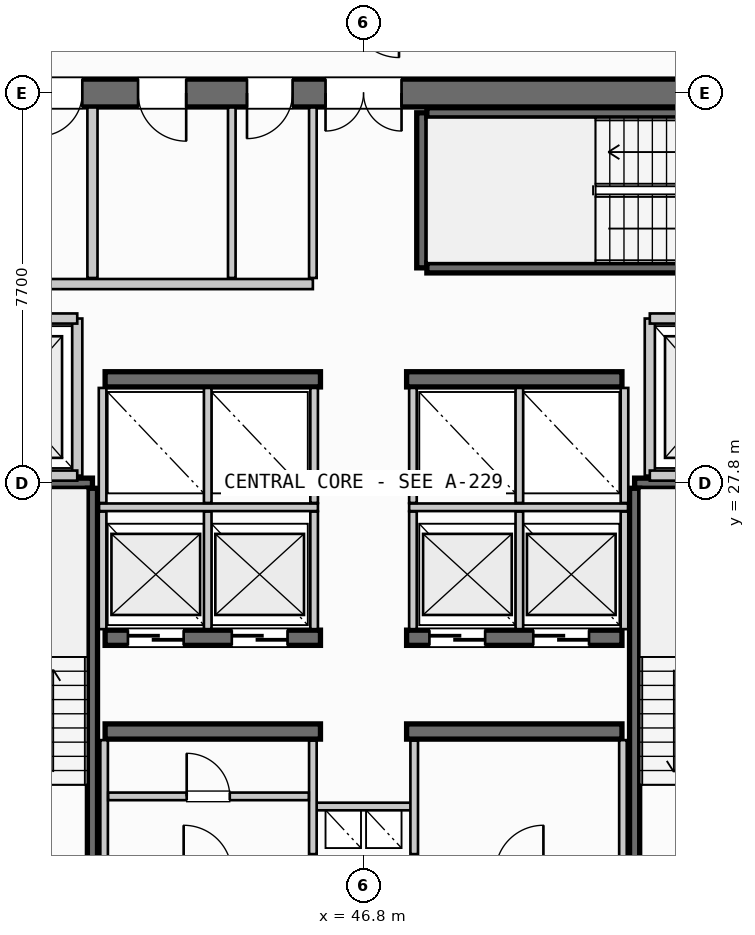
"""IFC4 building model, lengths in metres.
Left out: names, types, materials, properties, quantities, classifications, styles, units other than length and angle.
Written with IfcOpenShell. Run it as: python <this file> out.ifc"""

import sys

from ifc_helpers import new_model, si_unit, direction, frame, frame_2d, origin, place, context, subcontext, project, spatial, rectangle, extrude, source, transform, mapped, element, fill, save


model = new_model("IFC4")
c1 = context("Model", 3, precision=1e-05, world=origin(), true_north=direction((0.0, 1.0)))
c2 = subcontext(c1, "Body", "Model", "MODEL_VIEW")
j1 = project(units=[si_unit("LENGTHUNIT", "METRE"), si_unit("PLANEANGLEUNIT", "RADIAN")], contexts=[c1])
p1 = place(None, origin())
s1 = spatial("IfcSite", under=j1, at=p1, CompositionType="ELEMENT")
p2 = place(p1, origin())
s2 = spatial("IfcBuilding", under=s1, at=p2, CompositionType="ELEMENT")
p3 = place(p2, frame((0.0, 0.0, 207.9)))
s3 = spatial("IfcBuildingStorey", under=s2, at=p3, CompositionType="ELEMENT", Elevation=207.9)
p4 = place(p3, frame((55.6, 35.5, 0.0), z_axis=(0.0, 0.0, 1.0), x_axis=(-1.0, 0.0, 0.0)))
e1 = element("IfcWall", 1, at=p4, inside=s3, PredefinedType="SHEAR", context=c2, shape_type="SweptSolid", body=[
    extrude(rectangle(XDim=17.6, YDim=0.55, at=frame_2d((8.8, 0.0))), origin(), (0.0, 0.0, 1.0), 3.26),
])
p5 = place(p4, frame((8.05, 0.0, 0.0)))
e2 = element("IfcOpeningElement", 2, at=p5, cuts=e1, PredefinedType="OPENING", context=c2, shape_type="SweptSolid", body=[
    extrude(rectangle(XDim=1.5, YDim=2.2, at=frame_2d((0.75, 1.1))), frame((0.0, 0.285, 0.0), z_axis=(0.0, -1.0, 0.0), x_axis=(1.0, 0.0, 0.0)), (0.0, 0.0, 1.0), 0.57),
])
p6 = place(p4, frame((15.85, 0.0, 0.0)))
e3 = element("IfcOpeningElement", 3, at=p6, cuts=e1, PredefinedType="OPENING", context=c2, shape_type="SweptSolid", body=[
    extrude(rectangle(XDim=0.85, YDim=2.15, at=frame_2d((0.425, 1.075))), frame((0.0, 0.285, 0.0), z_axis=(0.0, -1.0, 0.0), x_axis=(1.0, 0.0, 0.0)), (0.0, 0.0, 1.0), 0.57),
])
p7 = place(p4, frame((14.35, 0.0, 0.0)))
e4 = element("IfcOpeningElement", 4, at=p7, cuts=e1, PredefinedType="OPENING", context=c2, shape_type="SweptSolid", body=[
    extrude(rectangle(XDim=0.85, YDim=2.15, at=frame_2d((0.425, 1.075))), frame((0.0, 0.285, 0.0), z_axis=(0.0, -1.0, 0.0), x_axis=(1.0, 0.0, 0.0)), (0.0, 0.0, 1.0), 0.57),
])
p8 = place(p4, frame((12.3, 0.0, 0.0)))
e5 = element("IfcOpeningElement", 5, at=p8, cuts=e1, PredefinedType="OPENING", context=c2, shape_type="SweptSolid", body=[
    extrude(rectangle(XDim=0.95, YDim=2.15, at=frame_2d((0.475, 1.075))), frame((0.0, 0.285, 0.0), z_axis=(0.0, -1.0, 0.0), x_axis=(1.0, 0.0, 0.0)), (0.0, 0.0, 1.0), 0.57),
])
p9 = place(p4, frame((10.2, 0.0, 0.0)))
e6 = element("IfcOpeningElement", 6, at=p9, cuts=e1, PredefinedType="OPENING", context=c2, shape_type="SweptSolid", body=[
    extrude(rectangle(XDim=0.9, YDim=2.15, at=frame_2d((0.45, 1.075))), frame((0.0, 0.285, 0.0), z_axis=(0.0, -1.0, 0.0), x_axis=(1.0, 0.0, 0.0)), (0.0, 0.0, 1.0), 0.57),
])
for number, where, z_axis, x_axis in (
    (7, (41.7, 22.9, 0.0), (0.0, 0.0, 1.0), (1.0, 0.0, 0.0)),
    (8, (47.65, 22.9, 0.0), (0.0, 0.0, 1.0), (1.0, 0.0, 0.0)),
):
    element("IfcWall", number, at=place(p3, frame(where, z_axis=z_axis, x_axis=x_axis)), inside=s3, PredefinedType="SHEAR", context=c2, shape_type="SweptSolid", body=[
        extrude(rectangle(XDim=4.25, YDim=0.3, at=frame_2d((2.125, 0.0))), origin(), (0.0, 0.0, 1.0), 3.26),
    ])
p10 = place(p3, frame((41.7, 24.75, 0.0), z_axis=(0.0, 0.0, 1.0), x_axis=(1.0, 0.0, 0.0)))
e9 = element("IfcWall", 9, at=p10, inside=s3, PredefinedType="SHEAR", context=c2, shape_type="SweptSolid", body=[
    extrude(rectangle(XDim=4.25, YDim=0.3, at=frame_2d((2.125, 0.0))), origin(), (0.0, 0.0, 1.0), 3.26),
])
p11 = place(p10, frame((0.45, 0.0, 0.0)))
e10 = element("IfcOpeningElement", 10, at=p11, cuts=e9, PredefinedType="OPENING", context=c2, shape_type="SweptSolid", body=[
    extrude(rectangle(XDim=1.1, YDim=2.2, at=frame_2d((0.55, 1.1))), frame((0.0, 0.16, 0.0), z_axis=(0.0, -1.0, 0.0), x_axis=(1.0, 0.0, 0.0)), (0.0, 0.0, 1.0), 0.32),
])
p12 = place(p10, frame((2.5, 0.0, 0.0)))
e11 = element("IfcOpeningElement", 11, at=p12, cuts=e9, PredefinedType="OPENING", context=c2, shape_type="SweptSolid", body=[
    extrude(rectangle(XDim=1.1, YDim=2.2, at=frame_2d((0.55, 1.1))), frame((0.0, 0.16, 0.0), z_axis=(0.0, -1.0, 0.0), x_axis=(1.0, 0.0, 0.0)), (0.0, 0.0, 1.0), 0.32),
])
p13 = place(p3, frame((47.65, 24.75, 0.0), z_axis=(0.0, 0.0, 1.0), x_axis=(1.0, 0.0, 0.0)))
e12 = element("IfcWall", 12, at=p13, inside=s3, PredefinedType="SHEAR", context=c2, shape_type="SweptSolid", body=[
    extrude(rectangle(XDim=4.25, YDim=0.3, at=frame_2d((2.125, 0.0))), origin(), (0.0, 0.0, 1.0), 3.26),
])
p14 = place(p13, frame((0.45, 0.0, 0.0)))
e13 = element("IfcOpeningElement", 13, at=p14, cuts=e12, PredefinedType="OPENING", context=c2, shape_type="SweptSolid", body=[
    extrude(rectangle(XDim=1.1, YDim=2.2, at=frame_2d((0.55, 1.1))), frame((0.0, 0.16, 0.0), z_axis=(0.0, -1.0, 0.0), x_axis=(1.0, 0.0, 0.0)), (0.0, 0.0, 1.0), 0.32),
])
p15 = place(p13, frame((2.5, 0.0, 0.0)))
e14 = element("IfcOpeningElement", 14, at=p15, cuts=e12, PredefinedType="OPENING", context=c2, shape_type="SweptSolid", body=[
    extrude(rectangle(XDim=1.1, YDim=2.2, at=frame_2d((0.55, 1.1))), frame((0.0, 0.16, 0.0), z_axis=(0.0, -1.0, 0.0), x_axis=(1.0, 0.0, 0.0)), (0.0, 0.0, 1.0), 0.32),
])
for number, where, z_axis, x_axis in (
    (15, (41.7, 29.85, 0.0), (0.0, 0.0, 1.0), (1.0, 0.0, 0.0)),
    (16, (47.65, 29.85, 0.0), (0.0, 0.0, 1.0), (1.0, 0.0, 0.0)),
):
    element("IfcWall", number, at=place(p3, frame(where, z_axis=z_axis, x_axis=x_axis)), inside=s3, PredefinedType="SHEAR", context=c2, shape_type="SweptSolid", body=[
        extrude(rectangle(XDim=4.25, YDim=0.3, at=frame_2d((2.125, 0.0))), origin(), (0.0, 0.0, 1.0), 3.26),
    ])
p16 = place(p3, frame((38.39, 27.8, 0.0), z_axis=(0.0, 0.0, 1.0), x_axis=(1.0, 0.0, 0.0)))
e17 = element("IfcWall", 17, at=p16, inside=s3, PredefinedType="SHEAR", context=c2, shape_type="SweptSolid", body=[
    extrude(rectangle(XDim=3.06, YDim=0.2, at=frame_2d((1.53, 0.0))), origin(), (0.0, 0.0, 1.0), 3.26),
])
p17 = place(p3, frame((41.45, 27.7, 0.0), z_axis=(0.0, 0.0, 1.0), x_axis=(0.0, -1.0, 0.0)))
e18 = element("IfcWall", 18, at=p17, inside=s3, PredefinedType="SHEAR", context=c2, shape_type="SweptSolid", body=[
    extrude(rectangle(XDim=7.35, YDim=0.2, at=frame_2d((3.675, 0.0))), origin(), (0.0, 0.0, 1.0), 3.26),
])
p18 = place(p3, frame((52.15, 27.8, 0.0), z_axis=(0.0, 0.0, 1.0), x_axis=(1.0, 0.0, 0.0)))
e19 = element("IfcWall", 19, at=p18, inside=s3, PredefinedType="SHEAR", context=c2, shape_type="SweptSolid", body=[
    extrude(rectangle(XDim=3.06, YDim=0.2, at=frame_2d((1.53, 0.0))), origin(), (0.0, 0.0, 1.0), 3.26),
])
p19 = place(p3, frame((52.15, 20.35, 0.0), z_axis=(0.0, 0.0, 1.0), x_axis=(0.0, 1.0, 0.0)))
e20 = element("IfcWall", 20, at=p19, inside=s3, PredefinedType="SHEAR", context=c2, shape_type="SweptSolid", body=[
    extrude(rectangle(XDim=7.35, YDim=0.2, at=frame_2d((3.675, 0.0))), origin(), (0.0, 0.0, 1.0), 3.26),
])
p20 = place(p3, frame((47.95, 32.05, 0.0), z_axis=(0.0, 0.0, 1.0), x_axis=(0.0, 1.0, 0.0)))
e21 = element("IfcWall", 21, at=p20, inside=s3, PredefinedType="SHEAR", context=c2, shape_type="SweptSolid", body=[
    extrude(rectangle(XDim=3.06, YDim=0.2, at=frame_2d((1.53, 0.0))), origin(), (0.0, 0.0, 1.0), 3.26),
])
for number, where, z_axis, x_axis in (
    (22, (48.05, 35.11, 0.0), (0.0, 0.0, 1.0), (1.0, 0.0, 0.0)),
    (23, (55.4, 32.05, 0.0), (0.0, 0.0, 1.0), (-1.0, 0.0, 0.0)),
):
    element("IfcWall", number, at=place(p3, frame(where, z_axis=z_axis, x_axis=x_axis)), inside=s3, PredefinedType="SHEAR", context=c2, shape_type="SweptSolid", body=[
        extrude(rectangle(XDim=7.35, YDim=0.2, at=frame_2d((3.675, 0.0))), origin(), (0.0, 0.0, 1.0), 3.26),
    ])
p21 = place(p3, frame((45.8, 21.42, 0.0), z_axis=(0.0, 0.0, 1.0), x_axis=(1.0, 0.0, 0.0)))
e24 = element("IfcWall", 24, at=p21, inside=s3, PredefinedType="PARTITIONING", context=c2, shape_type="SweptSolid", body=[
    extrude(rectangle(XDim=2.0, YDim=0.15, at=frame_2d((1.0, 0.0))), origin(), (0.0, 0.0, 1.0), 2.455),
])
for number, where, z_axis, x_axis in (
    (25, (45.8, 20.48, 0.0), (0.0, 0.0, 1.0), (0.0, 1.0, 0.0)),
    (26, (47.8, 20.48, 0.0), (0.0, 0.0, 1.0), (0.0, 1.0, 0.0)),
):
    element("IfcWall", number, at=place(p3, frame(where, z_axis=z_axis, x_axis=x_axis)), inside=s3, PredefinedType="PARTITIONING", context=c2, shape_type="SweptSolid", body=[
        extrude(rectangle(XDim=2.24, YDim=0.15, at=frame_2d((1.12, 0.0))), origin(), (0.0, 0.0, 1.0), 2.455),
    ])
p22 = place(p3, frame((41.15, 27.95, 0.0), z_axis=(0.0, 0.0, 1.0), x_axis=(0.0, 1.0, 0.0)))
e27 = element("IfcWall", 27, at=p22, inside=s3, PredefinedType="PARTITIONING", context=c2, shape_type="SweptSolid", body=[
    extrude(rectangle(XDim=3.1, YDim=0.2, at=frame_2d((1.55, 0.0))), origin(), (0.0, 0.0, 1.0), 2.455),
])
for number, where, z_axis, x_axis in (
    (28, (38.285, 27.95, 0.0), (0.0, 0.0, 1.0), (1.0, 0.0, 0.0)),
    (29, (38.285, 31.05, 0.0), (0.0, 0.0, 1.0), (1.0, 0.0, 0.0)),
):
    element("IfcWall", number, at=place(p3, frame(where, z_axis=z_axis, x_axis=x_axis)), inside=s3, PredefinedType="PARTITIONING", context=c2, shape_type="SweptSolid", body=[
        extrude(rectangle(XDim=2.865, YDim=0.2, at=frame_2d((1.433, 0.0))), origin(), (0.0, 0.0, 1.0), 2.455),
    ])
p23 = place(p3, frame((52.45, 27.95, 0.0), z_axis=(0.0, 0.0, 1.0), x_axis=(0.0, 1.0, 0.0)))
e30 = element("IfcWall", 30, at=p23, inside=s3, PredefinedType="PARTITIONING", context=c2, shape_type="SweptSolid", body=[
    extrude(rectangle(XDim=3.1, YDim=0.2, at=frame_2d((1.55, 0.0))), origin(), (0.0, 0.0, 1.0), 2.455),
])
for number, where, z_axis, x_axis in (
    (31, (52.45, 27.95, 0.0), (0.0, 0.0, 1.0), (1.0, 0.0, 0.0)),
    (32, (52.45, 31.05, 0.0), (0.0, 0.0, 1.0), (1.0, 0.0, 0.0)),
):
    element("IfcWall", number, at=place(p3, frame(where, z_axis=z_axis, x_axis=x_axis)), inside=s3, PredefinedType="PARTITIONING", context=c2, shape_type="SweptSolid", body=[
        extrude(rectangle(XDim=2.865, YDim=0.2, at=frame_2d((1.433, 0.0))), origin(), (0.0, 0.0, 1.0), 2.455),
    ])
for number, where, z_axis, x_axis in (
    (33, (41.68, 20.385, 0.0), (0.0, 0.0, 1.0), (0.0, 1.0, 0.0)),
    (34, (51.92, 20.385, 0.0), (0.0, 0.0, 1.0), (0.0, 1.0, 0.0)),
):
    element("IfcWall", number, at=place(p3, frame(where, z_axis=z_axis, x_axis=x_axis)), inside=s3, PredefinedType="PARTITIONING", context=c2, shape_type="SweptSolid", body=[
        extrude(rectangle(XDim=2.345, YDim=0.15, at=frame_2d((1.172, 0.0))), origin(), (0.0, 0.0, 1.0), 2.455),
    ])
p24 = place(p3, frame((41.76, 21.62, 0.0), z_axis=(0.0, 0.0, 1.0), x_axis=(1.0, 0.0, 0.0)))
e35 = element("IfcWall", 35, at=p24, inside=s3, PredefinedType="PARTITIONING", context=c2, shape_type="SweptSolid", body=[
    extrude(rectangle(XDim=3.96, YDim=0.15, at=frame_2d((1.98, 0.0))), origin(), (0.0, 0.0, 1.0), 2.455),
])
p25 = place(p24, frame((1.55, 0.0, 0.0)))
e36 = element("IfcOpeningElement", 36, at=p25, cuts=e35, PredefinedType="OPENING", context=c2, shape_type="SweptSolid", body=[
    extrude(rectangle(XDim=0.85, YDim=2.15, at=frame_2d((0.425, 1.075))), frame((0.0, 0.085, 0.0), z_axis=(0.0, -1.0, 0.0), x_axis=(1.0, 0.0, 0.0)), (0.0, 0.0, 1.0), 0.17),
])
p26 = place(p3, frame((41.58, 27.325, 0.0), z_axis=(0.0, 0.0, 1.0), x_axis=(1.0, 0.0, 0.0)))
e37 = element("IfcWall", 37, at=p26, inside=s3, PredefinedType="PARTITIONING", context=c2, shape_type="SweptSolid", body=[
    extrude(rectangle(XDim=4.32, YDim=0.15, at=frame_2d((2.16, 0.0))), origin(), (0.0, 0.0, 1.0), 2.455),
])
p27 = place(p3, frame((47.7, 27.325, 0.0), z_axis=(0.0, 0.0, 1.0), x_axis=(1.0, 0.0, 0.0)))
e38 = element("IfcWall", 38, at=p27, inside=s3, PredefinedType="PARTITIONING", context=c2, shape_type="SweptSolid", body=[
    extrude(rectangle(XDim=4.32, YDim=0.15, at=frame_2d((2.16, 0.0))), origin(), (0.0, 0.0, 1.0), 2.455),
])
for number, where, z_axis, x_axis in (
    (39, (41.65, 24.92, 0.0), (0.0, 0.0, 1.0), (0.0, 1.0, 0.0)),
    (40, (43.725, 24.92, 0.0), (0.0, 0.0, 1.0), (0.0, 1.0, 0.0)),
    (41, (45.825, 24.92, 0.0), (0.0, 0.0, 1.0), (0.0, 1.0, 0.0)),
    (42, (47.775, 24.92, 0.0), (0.0, 0.0, 1.0), (0.0, 1.0, 0.0)),
    (43, (49.875, 24.92, 0.0), (0.0, 0.0, 1.0), (0.0, 1.0, 0.0)),
    (44, (51.95, 24.92, 0.0), (0.0, 0.0, 1.0), (0.0, 1.0, 0.0)),
):
    element("IfcWall", number, at=place(p3, frame(where, z_axis=z_axis, x_axis=x_axis)), inside=s3, PredefinedType="PARTITIONING", context=c2, shape_type="SweptSolid", body=[
        extrude(rectangle(XDim=2.32, YDim=0.15, at=frame_2d((1.16, 0.0))), origin(), (0.0, 0.0, 1.0), 2.455),
    ])
for number, where, z_axis, x_axis in (
    (45, (41.65, 27.41, 0.0), (0.0, 0.0, 1.0), (0.0, 1.0, 0.0)),
    (46, (43.725, 27.41, 0.0), (0.0, 0.0, 1.0), (0.0, 1.0, 0.0)),
    (47, (45.825, 27.41, 0.0), (0.0, 0.0, 1.0), (0.0, 1.0, 0.0)),
    (48, (47.775, 27.41, 0.0), (0.0, 0.0, 1.0), (0.0, 1.0, 0.0)),
    (49, (49.875, 27.41, 0.0), (0.0, 0.0, 1.0), (0.0, 1.0, 0.0)),
    (50, (51.95, 27.41, 0.0), (0.0, 0.0, 1.0), (0.0, 1.0, 0.0)),
):
    element("IfcWall", number, at=place(p3, frame(where, z_axis=z_axis, x_axis=x_axis)), inside=s3, PredefinedType="PARTITIONING", context=c2, shape_type="SweptSolid", body=[
        extrude(rectangle(XDim=2.27, YDim=0.15, at=frame_2d((1.135, 0.0))), origin(), (0.0, 0.0, 1.0), 2.455),
    ])
p28 = place(p3, frame((41.45, 31.85, 0.0), z_axis=(0.0, 0.0, 1.0), x_axis=(0.0, 1.0, 0.0)))
e51 = element("IfcWall", 51, at=p28, inside=s3, PredefinedType="PARTITIONING", context=c2, shape_type="SweptSolid", body=[
    extrude(rectangle(XDim=3.365, YDim=0.2, at=frame_2d((1.683, 0.0))), origin(), (0.0, 0.0, 1.0), 2.455),
])
p29 = place(p3, frame((38.285, 31.73, 0.0), z_axis=(0.0, 0.0, 1.0), x_axis=(1.0, 0.0, 0.0)))
e52 = element("IfcWall", 52, at=p29, inside=s3, PredefinedType="PARTITIONING", context=c2, shape_type="SweptSolid", body=[
    extrude(rectangle(XDim=7.515, YDim=0.2, at=frame_2d((3.758, 0.0))), origin(), (0.0, 0.0, 1.0), 2.455),
])
p30 = place(p3, frame((45.8, 31.85, 0.0), z_axis=(0.0, 0.0, 1.0), x_axis=(0.0, 1.0, 0.0)))
e53 = element("IfcWall", 53, at=p30, inside=s3, PredefinedType="PARTITIONING", context=c2, shape_type="SweptSolid", body=[
    extrude(rectangle(XDim=3.365, YDim=0.15, at=frame_2d((1.683, 0.0))), origin(), (0.0, 0.0, 1.0), 2.455),
])
p31 = place(p3, frame((44.2, 31.85, 0.0), z_axis=(0.0, 0.0, 1.0), x_axis=(0.0, 1.0, 0.0)))
e54 = element("IfcWall", 54, at=p31, inside=s3, PredefinedType="PLUMBINGWALL", context=c2, shape_type="SweptSolid", body=[
    extrude(rectangle(XDim=3.365, YDim=0.15, at=frame_2d((1.683, 0.0))), origin(), (0.0, 0.0, 1.0), 2.455),
])
m1 = source(origin(), c2, "Body", "SweptSolid", [
    extrude(rectangle(XDim=1.5, YDim=2.2, at=frame_2d((0.75, 1.1))), frame((0.0, 0.025, 0.0), z_axis=(0.0, -1.0, 0.0), x_axis=(1.0, 0.0, 0.0)), (0.0, 0.0, 1.0), 0.05),
])
p32 = place(p5, origin())
e55 = element("IfcDoor", 55, at=p32, inside=s3, OperationType="DOUBLE_DOOR_SINGLE_SWING", PredefinedType="DOOR", context=c2, shape_type="MappedRepresentation", body=[
    mapped(m1, transform((0.0, 0.0, 0.0), scale=1.0)),
])
fill(e2, e55)
m2 = source(origin(), c2, "Body", "SweptSolid", [
    extrude(rectangle(XDim=1.1, YDim=2.2, at=frame_2d((0.55, 1.1))), frame((0.0, 0.025, 0.0), z_axis=(0.0, -1.0, 0.0), x_axis=(1.0, 0.0, 0.0)), (0.0, 0.0, 1.0), 0.05),
])
p33 = place(p11, origin())
e56 = element("IfcDoor", 56, at=p33, inside=s3, OperationType="SLIDING_TO_RIGHT", PredefinedType="DOOR", context=c2, shape_type="MappedRepresentation", body=[
    mapped(m2, transform((0.0, 0.0, 0.0), scale=1.0)),
])
fill(e10, e56)
p34 = place(p12, origin())
e57 = element("IfcDoor", 57, at=p34, inside=s3, OperationType="SLIDING_TO_RIGHT", PredefinedType="DOOR", context=c2, shape_type="MappedRepresentation", body=[
    mapped(m2, transform((0.0, 0.0, 0.0), scale=1.0)),
])
fill(e11, e57)
p35 = place(p14, origin())
e58 = element("IfcDoor", 58, at=p35, inside=s3, OperationType="SLIDING_TO_RIGHT", PredefinedType="DOOR", context=c2, shape_type="MappedRepresentation", body=[
    mapped(m2, transform((0.0, 0.0, 0.0), scale=1.0)),
])
fill(e13, e58)
p36 = place(p15, origin())
e59 = element("IfcDoor", 59, at=p36, inside=s3, OperationType="SLIDING_TO_RIGHT", PredefinedType="DOOR", context=c2, shape_type="MappedRepresentation", body=[
    mapped(m2, transform((0.0, 0.0, 0.0), scale=1.0)),
])
fill(e14, e59)
m3 = source(origin(), c2, "Body", "SweptSolid", [
    extrude(rectangle(XDim=0.85, YDim=2.15, at=frame_2d((0.425, 1.075))), frame((0.0, 0.025, 0.0), z_axis=(0.0, -1.0, 0.0), x_axis=(1.0, 0.0, 0.0)), (0.0, 0.0, 1.0), 0.05),
])
p37 = place(p7, origin())
e60 = element("IfcDoor", 60, at=p37, inside=s3, OperationType="SINGLE_SWING_RIGHT", PredefinedType="DOOR", context=c2, shape_type="MappedRepresentation", body=[
    mapped(m3, transform((0.0, 0.0, 0.0), scale=1.0)),
])
fill(e4, e60)
m4 = source(origin(), c2, "Body", "SweptSolid", [
    extrude(rectangle(XDim=0.95, YDim=2.15, at=frame_2d((0.475, 1.075))), frame((0.0, 0.025, 0.0), z_axis=(0.0, -1.0, 0.0), x_axis=(1.0, 0.0, 0.0)), (0.0, 0.0, 1.0), 0.05),
])
p38 = place(p8, origin())
e61 = element("IfcDoor", 61, at=p38, inside=s3, OperationType="SINGLE_SWING_LEFT", PredefinedType="DOOR", context=c2, shape_type="MappedRepresentation", body=[
    mapped(m4, transform((0.0, 0.0, 0.0), scale=1.0)),
])
fill(e5, e61)
m5 = source(origin(), c2, "Body", "SweptSolid", [
    extrude(rectangle(XDim=0.9, YDim=2.15, at=frame_2d((0.45, 1.075))), frame((0.0, 0.025, 0.0), z_axis=(0.0, -1.0, 0.0), x_axis=(1.0, 0.0, 0.0)), (0.0, 0.0, 1.0), 0.05),
])
p39 = place(p9, origin())
e62 = element("IfcDoor", 62, at=p39, inside=s3, OperationType="SINGLE_SWING_RIGHT", PredefinedType="DOOR", context=c2, shape_type="MappedRepresentation", body=[
    mapped(m5, transform((0.0, 0.0, 0.0), scale=1.0)),
])
fill(e6, e62)
p40 = place(p25, origin())
e63 = element("IfcDoor", 63, at=p40, inside=s3, OperationType="SINGLE_SWING_LEFT", PredefinedType="DOOR", context=c2, shape_type="MappedRepresentation", body=[
    mapped(m3, transform((0.0, 0.0, 0.0), scale=1.0)),
])
fill(e36, e63)
save(model, sys.argv[1])
